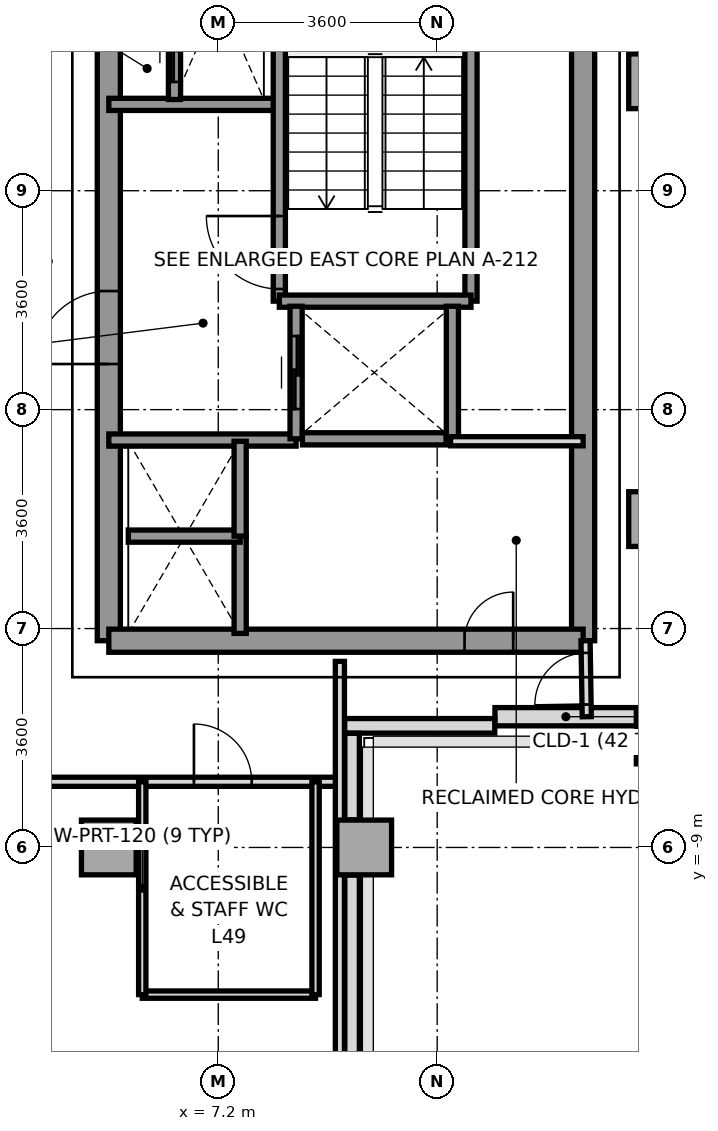
"""IFC4 building model, lengths in metres.
Left out: names, types, materials, properties, quantities, classifications, styles, units other than length and angle.
Written with IfcOpenShell. Run it as: python <this file> out.ifc"""

import sys

from ifc_helpers import new_model, si_unit, direction, frame, frame_2d, origin, origin_2d, place, context, subcontext, project, spatial, rectangle, extrude, source, transform, mapped, element, fill, save


model = new_model("IFC4")
c1 = context("Model", 3, precision=1e-05, world=origin(), true_north=direction((0.0, 1.0)))
c2 = subcontext(c1, "Body", "Model", "MODEL_VIEW")
j1 = project(units=[si_unit("LENGTHUNIT", "METRE"), si_unit("PLANEANGLEUNIT", "RADIAN")], contexts=[c1])
p1 = place(None, origin())
s1 = spatial("IfcSite", under=j1, at=p1, CompositionType="ELEMENT")
p2 = place(p1, origin())
s2 = spatial("IfcBuilding", under=s1, at=p2, CompositionType="ELEMENT")
p3 = place(p2, frame((0.0, 0.0, 180.8)))
s3 = spatial("IfcBuildingStorey", under=s2, at=p3, CompositionType="ELEMENT", Elevation=180.8)
m1 = source(origin(), c2, "Body", "SweptSolid", [
    extrude(rectangle(XDim=0.9, YDim=0.9, at=origin_2d()), origin(), (0.0, 0.0, 1.0), 3.2),
])
for number, where, z_axis, x_axis in (
    (1, (5.4, -9.0, 0.0), (0.0, 0.0, 1.0), (1.0, 0.0, 0.0)),
    (2, (9.6, -9.0, 0.0), (0.0, 0.0, 1.0), (1.0, 0.0, 0.0)),
):
    element("IfcColumn", number, at=place(p3, frame(where, z_axis=z_axis, x_axis=x_axis)), inside=s3, PredefinedType="COLUMN", context=c2, shape_type="MappedRepresentation", body=[
        mapped(m1, transform((0.0, 0.0, 0.0), x_axis=(1.0, 0.0, 0.0), y_axis=(0.0, 1.0, 0.0), z_axis=(0.0, 0.0, 1.0), scale=1.0)),
    ])
m2 = source(origin(), c2, "Body", "SweptSolid", [
    extrude(rectangle(XDim=0.65, YDim=0.85, at=origin_2d()), origin(), (0.0, 0.0, 1.0), 3.2),
])
p4 = place(p3, frame((14.4, -7.2, 0.0), z_axis=(0.0, 0.0, 1.0), x_axis=(1.0, 0.0, 0.0)))
e3 = element("IfcColumn", 3, at=p4, inside=s3, PredefinedType="COLUMN", context=c2, shape_type="MappedRepresentation", body=[
    mapped(m2, transform((0.0, 0.0, 0.0), x_axis=(1.0, 0.0, 0.0), y_axis=(0.0, 1.0, 0.0), z_axis=(0.0, 0.0, 1.0), scale=1.0)),
])
for number, where, z_axis, x_axis in (
    (4, (14.4, -3.6, 0.0), (0.0, 0.0, 1.0), (1.0, 0.0, 0.0)),
    (5, (14.4, 3.6, 0.0), (0.0, 0.0, 1.0), (1.0, 0.0, 0.0)),
):
    element("IfcColumn", number, at=place(p3, frame(where, z_axis=z_axis, x_axis=x_axis)), inside=s3, PredefinedType="COLUMN", context=c2, shape_type="MappedRepresentation", body=[
        mapped(m1, transform((0.0, 0.0, 0.0), x_axis=(1.0, 0.0, 0.0), y_axis=(0.0, 1.0, 0.0), z_axis=(0.0, 0.0, 1.0), scale=1.0)),
    ])
p5 = place(p3, frame((11.75, -6.85, 0.0), z_axis=(0.0, 0.0, 1.0), x_axis=(1.0, 0.0, 0.0)))
e6 = element("IfcWall", 6, at=p5, inside=s3, PredefinedType="SOLIDWALL", context=c2, shape_type="SweptSolid", body=[
    extrude(rectangle(XDim=2.333, YDim=0.3, at=frame_2d((1.167, 0.0))), origin(), (0.0, 0.0, 1.0), 3.2),
])
p6 = place(p3, frame((11.747, -7.0, 0.0), z_axis=(0.0, 0.0, 1.0), x_axis=(-1.0, 0.0, 0.0)))
e7 = element("IfcWall", 7, at=p6, inside=s3, PredefinedType="PARAPET", context=c2, shape_type="SweptSolid", body=[
    extrude(rectangle(XDim=2.469, YDim=0.24, at=frame_2d((1.234, 0.0))), origin(), (0.0, 0.0, 1.0), 1.15),
])
p7 = place(p3, frame((9.4, -7.123, 0.0), z_axis=(0.0, 0.0, 1.0), x_axis=(0.0, -1.0, 0.0)))
e8 = element("IfcWall", 8, at=p7, inside=s3, PredefinedType="PARAPET", context=c2, shape_type="SweptSolid", body=[
    extrude(rectangle(XDim=1.424, YDim=0.24, at=frame_2d((0.712, 0.0))), origin(), (0.0, 0.0, 1.0), 1.15),
])
p8 = place(p3, frame((9.4, -9.453, 0.0), z_axis=(0.0, 0.0, 1.0), x_axis=(0.0, -1.0, 0.0)))
e9 = element("IfcWall", 9, at=p8, inside=s3, PredefinedType="PARAPET", context=c2, shape_type="SweptSolid", body=[
    extrude(rectangle(XDim=6.15, YDim=0.24, at=frame_2d((3.075, 0.0))), origin(), (0.0, 0.0, 1.0), 1.15),
])
p9 = place(p3, frame((13.2, -5.6, 0.0), z_axis=(0.0, 0.0, 1.0), x_axis=(0.0, 1.0, 0.0)))
e10 = element("IfcWall", 10, at=p9, inside=s3, PredefinedType="SHEAR", context=c2, shape_type="SweptSolid", body=[
    extrude(rectangle(XDim=11.2, YDim=0.38, at=frame_2d((5.6, 0.0))), origin(), (0.0, 0.0, 1.0), 3.2),
])
p10 = place(p3, frame((5.4, -5.6, 0.0), z_axis=(0.0, 0.0, 1.0), x_axis=(0.0, 1.0, 0.0)))
e11 = element("IfcWall", 11, at=p10, inside=s3, PredefinedType="SHEAR", context=c2, shape_type="SweptSolid", body=[
    extrude(rectangle(XDim=12.5, YDim=0.38, at=frame_2d((6.25, 0.0))), origin(), (0.0, 0.0, 1.0), 3.2),
])
p11 = place(p10, frame((4.55, 0.0, 0.0)))
e12 = element("IfcOpeningElement", 12, at=p11, cuts=e11, PredefinedType="OPENING", context=c2, shape_type="SweptSolid", body=[
    extrude(rectangle(XDim=1.2, YDim=2.2, at=frame_2d((0.6, 1.1))), frame((0.0, 0.2, 0.0), z_axis=(0.0, -1.0, 0.0), x_axis=(1.0, 0.0, 0.0)), (0.0, 0.0, 1.0), 0.4),
])
p12 = place(p10, frame((10.45, 0.0, 0.0)))
e13 = element("IfcOpeningElement", 13, at=p12, cuts=e11, PredefinedType="OPENING", context=c2, shape_type="SweptSolid", body=[
    extrude(rectangle(XDim=1.2, YDim=2.2, at=frame_2d((0.6, 1.1))), frame((0.0, 0.2, 0.0), z_axis=(0.0, -1.0, 0.0), x_axis=(1.0, 0.0, 0.0)), (0.0, 0.0, 1.0), 0.4),
])
p13 = place(p3, frame((5.4, -5.6, 0.0), z_axis=(0.0, 0.0, 1.0), x_axis=(1.0, 0.0, 0.0)))
e14 = element("IfcWall", 14, at=p13, inside=s3, PredefinedType="SHEAR", context=c2, shape_type="SweptSolid", body=[
    extrude(rectangle(XDim=7.8, YDim=0.38, at=frame_2d((3.9, 0.0))), origin(), (0.0, 0.0, 1.0), 3.2),
])
p14 = place(p13, frame((5.85, 0.0, 0.0)))
e15 = element("IfcOpeningElement", 15, at=p14, cuts=e14, PredefinedType="OPENING", context=c2, shape_type="SweptSolid", body=[
    extrude(rectangle(XDim=0.8, YDim=2.1, at=frame_2d((0.4, 1.05))), frame((0.0, 0.2, 0.0), z_axis=(0.0, -1.0, 0.0), x_axis=(1.0, 0.0, 0.0)), (0.0, 0.0, 1.0), 0.4),
])
p15 = place(p3, frame((5.4, 3.22, 0.0), z_axis=(0.0, 0.0, 1.0), x_axis=(1.0, 0.0, 0.0)))
e16 = element("IfcWall", 16, at=p15, inside=s3, PredefinedType="SOLIDWALL", context=c2, shape_type="SweptSolid", body=[
    extrude(rectangle(XDim=2.78, YDim=0.2, at=frame_2d((1.39, 0.0))), origin(), (0.0, 0.0, 1.0), 3.2),
])
p16 = place(p3, frame((5.4, -2.3, 0.0), z_axis=(0.0, 0.0, 1.0), x_axis=(1.0, 0.0, 0.0)))
e17 = element("IfcWall", 17, at=p16, inside=s3, PredefinedType="SOLIDWALL", context=c2, shape_type="SweptSolid", body=[
    extrude(rectangle(XDim=3.08, YDim=0.2, at=frame_2d((1.54, 0.0))), origin(), (0.0, 0.0, 1.0), 3.2),
])
p17 = place(p3, frame((8.204, -0.016, 0.0), z_axis=(0.0, 0.0, 1.0), x_axis=(0.0, 1.0, 0.0)))
e18 = element("IfcWall", 18, at=p17, inside=s3, PredefinedType="SOLIDWALL", context=c2, shape_type="SweptSolid", body=[
    extrude(rectangle(XDim=6.916, YDim=0.2, at=frame_2d((3.458, 0.0))), origin(), (0.0, 0.0, 1.0), 3.2),
])
p18 = place(p17, frame((0.2, 0.0, 0.0)))
e19 = element("IfcOpeningElement", 19, at=p18, cuts=e18, PredefinedType="OPENING", context=c2, shape_type="SweptSolid", body=[
    extrude(rectangle(XDim=1.2, YDim=2.2, at=frame_2d((0.6, 1.1))), frame((0.0, 0.11, 0.0), z_axis=(0.0, -1.0, 0.0), x_axis=(1.0, 0.0, 0.0)), (0.0, 0.0, 1.0), 0.22),
])
p19 = place(p3, frame((11.356, -0.016, 0.0), z_axis=(0.0, 0.0, 1.0), x_axis=(0.0, 1.0, 0.0)))
e20 = element("IfcWall", 20, at=p19, inside=s3, PredefinedType="SOLIDWALL", context=c2, shape_type="SweptSolid", body=[
    extrude(rectangle(XDim=6.916, YDim=0.2, at=frame_2d((3.458, 0.0))), origin(), (0.0, 0.0, 1.0), 3.2),
])
p20 = place(p3, frame((8.204, -0.016, 0.0), z_axis=(0.0, 0.0, 1.0), x_axis=(1.0, 0.0, 0.0)))
e21 = element("IfcWall", 21, at=p20, inside=s3, PredefinedType="SOLIDWALL", context=c2, shape_type="SweptSolid", body=[
    extrude(rectangle(XDim=3.152, YDim=0.2, at=frame_2d((1.576, 0.0))), origin(), (0.0, 0.0, 1.0), 3.2),
])
p21 = place(p3, frame((8.48, -2.28, 0.0), z_axis=(0.0, 0.0, 1.0), x_axis=(0.0, 1.0, 0.0)))
e22 = element("IfcWall", 22, at=p21, inside=s3, PredefinedType="SOLIDWALL", context=c2, shape_type="SweptSolid", body=[
    extrude(rectangle(XDim=2.18, YDim=0.2, at=frame_2d((1.09, 0.0))), origin(), (0.0, 0.0, 1.0), 3.2),
])
p22 = place(p21, frame((0.49, 0.0, 0.0)))
e23 = element("IfcOpeningElement", 23, at=p22, cuts=e22, PredefinedType="OPENING", context=c2, shape_type="SweptSolid", body=[
    extrude(rectangle(XDim=1.2, YDim=2.2, at=frame_2d((0.6, 1.1))), frame((0.0, 0.11, 0.0), z_axis=(0.0, -1.0, 0.0), x_axis=(1.0, 0.0, 0.0)), (0.0, 0.0, 1.0), 0.22),
])
p23 = place(p3, frame((11.05, -2.28, 0.0), z_axis=(0.0, 0.0, 1.0), x_axis=(0.0, 1.0, 0.0)))
e24 = element("IfcWall", 24, at=p23, inside=s3, PredefinedType="SOLIDWALL", context=c2, shape_type="SweptSolid", body=[
    extrude(rectangle(XDim=2.18, YDim=0.2, at=frame_2d((1.09, 0.0))), origin(), (0.0, 0.0, 1.0), 3.2),
])
p24 = place(p3, frame((8.584, -2.28, 0.0), z_axis=(0.0, 0.0, 1.0), x_axis=(1.0, 0.0, 0.0)))
e25 = element("IfcWall", 25, at=p24, inside=s3, PredefinedType="SOLIDWALL", context=c2, shape_type="SweptSolid", body=[
    extrude(rectangle(XDim=2.362, YDim=0.2, at=frame_2d((1.181, 0.0))), origin(), (0.0, 0.0, 1.0), 3.2),
])
p25 = place(p3, frame((7.56, -5.48, 0.0), z_axis=(0.0, 0.0, 1.0), x_axis=(0.0, 1.0, 0.0)))
e26 = element("IfcWall", 26, at=p25, inside=s3, PredefinedType="SOLIDWALL", context=c2, shape_type="SweptSolid", body=[
    extrude(rectangle(XDim=1.6, YDim=0.2, at=frame_2d((0.8, 0.0))), origin(), (0.0, 0.0, 1.0), 3.2),
])
p26 = place(p3, frame((5.72, -3.88, 0.0), z_axis=(0.0, 0.0, 1.0), x_axis=(1.0, 0.0, 0.0)))
e27 = element("IfcWall", 27, at=p26, inside=s3, PredefinedType="SOLIDWALL", context=c2, shape_type="SweptSolid", body=[
    extrude(rectangle(XDim=1.84, YDim=0.2, at=frame_2d((0.92, 0.0))), origin(), (0.0, 0.0, 1.0), 3.2),
])
p27 = place(p3, frame((7.56, -3.88, 0.0), z_axis=(0.0, 0.0, 1.0), x_axis=(0.0, 1.0, 0.0)))
e28 = element("IfcWall", 28, at=p27, inside=s3, PredefinedType="SOLIDWALL", context=c2, shape_type="SweptSolid", body=[
    extrude(rectangle(XDim=1.56, YDim=0.2, at=frame_2d((0.78, 0.0))), origin(), (0.0, 0.0, 1.0), 3.2),
])
p28 = place(p3, frame((6.48, 3.3, 0.0), z_axis=(0.0, 0.0, 1.0), x_axis=(0.0, 1.0, 0.0)))
e29 = element("IfcWall", 29, at=p28, inside=s3, PredefinedType="SOLIDWALL", context=c2, shape_type="SweptSolid", body=[
    extrude(rectangle(XDim=1.68, YDim=0.2, at=frame_2d((0.84, 0.0))), origin(), (0.0, 0.0, 1.0), 3.2),
])
p29 = place(p28, frame((0.29, 0.0, 0.0)))
e30 = element("IfcOpeningElement", 30, at=p29, cuts=e29, PredefinedType="OPENING", context=c2, shape_type="SweptSolid", body=[
    extrude(rectangle(XDim=1.1, YDim=2.2, at=frame_2d((0.55, 1.1))), frame((0.0, 0.11, 0.0), z_axis=(0.0, -1.0, 0.0), x_axis=(1.0, 0.0, 0.0)), (0.0, 0.0, 1.0), 0.22),
])
p30 = place(p3, frame((11.02, -2.32, 0.0), z_axis=(0.0, 0.0, 1.0), x_axis=(1.0, 0.0, 0.0)))
e31 = element("IfcWall", 31, at=p30, inside=s3, PredefinedType="PARTITIONING", context=c2, shape_type="SweptSolid", body=[
    extrude(rectangle(XDim=2.18, YDim=0.15, at=frame_2d((1.09, 0.0))), origin(), (0.0, 0.0, 1.0), 3.2),
])
p31 = place(p3, frame((-9.2, -7.92, 0.0), z_axis=(0.0, 0.0, 1.0), x_axis=(1.0, 0.0, 0.0)))
e32 = element("IfcWall", 32, at=p31, inside=s3, PredefinedType="PARTITIONING", context=c2, shape_type="SweptSolid", body=[
    extrude(rectangle(XDim=18.4, YDim=0.15, at=frame_2d((9.2, 0.0))), origin(), (0.0, 0.0, 1.0), 2.8),
])
p32 = place(p31, frame((16.0, 0.0, 0.0)))
e33 = element("IfcOpeningElement", 33, at=p32, cuts=e32, PredefinedType="OPENING", context=c2, shape_type="SweptSolid", body=[
    extrude(rectangle(XDim=0.95, YDim=2.15, at=frame_2d((0.475, 1.075))), frame((0.0, 0.085, 0.0), z_axis=(0.0, -1.0, 0.0), x_axis=(1.0, 0.0, 0.0)), (0.0, 0.0, 1.0), 0.17),
])
p33 = place(p31, frame((2.2, 0.0, 0.0)))
e34 = element("IfcOpeningElement", 34, at=p33, cuts=e32, PredefinedType="OPENING", context=c2, shape_type="SweptSolid", body=[
    extrude(rectangle(XDim=0.95, YDim=2.15, at=frame_2d((0.475, 1.075))), frame((0.0, 0.085, 0.0), z_axis=(0.0, -1.0, 0.0), x_axis=(1.0, 0.0, 0.0)), (0.0, 0.0, 1.0), 0.17),
])
p34 = place(p31, frame((7.8, 0.0, 0.0)))
e35 = element("IfcOpeningElement", 35, at=p34, cuts=e32, PredefinedType="OPENING", context=c2, shape_type="SweptSolid", body=[
    extrude(rectangle(XDim=1.1, YDim=2.2, at=frame_2d((0.55, 1.1))), frame((0.0, 0.085, 0.0), z_axis=(0.0, -1.0, 0.0), x_axis=(1.0, 0.0, 0.0)), (0.0, 0.0, 1.0), 0.17),
])
p35 = place(p31, frame((11.15, 0.0, 0.0)))
e36 = element("IfcOpeningElement", 36, at=p35, cuts=e32, PredefinedType="OPENING", context=c2, shape_type="SweptSolid", body=[
    extrude(rectangle(XDim=0.95, YDim=2.15, at=frame_2d((0.475, 1.075))), frame((0.0, 0.085, 0.0), z_axis=(0.0, -1.0, 0.0), x_axis=(1.0, 0.0, 0.0)), (0.0, 0.0, 1.0), 0.17),
])
p36 = place(p3, frame((9.2, -15.68, 0.0), z_axis=(0.0, 0.0, 1.0), x_axis=(0.0, 1.0, 0.0)))
e37 = element("IfcWall", 37, at=p36, inside=s3, PredefinedType="PARTITIONING", context=c2, shape_type="SweptSolid", body=[
    extrude(rectangle(XDim=9.74, YDim=0.15, at=frame_2d((4.87, 0.0))), origin(), (0.0, 0.0, 1.0), 2.75),
])
p37 = place(p3, frame((5.95, -11.42, 0.0), z_axis=(0.0, 0.0, 1.0), x_axis=(1.0, 0.0, 0.0)))
e38 = element("IfcWall", 38, at=p37, inside=s3, PredefinedType="PARTITIONING", context=c2, shape_type="SweptSolid", body=[
    extrude(rectangle(XDim=2.85, YDim=0.12, at=frame_2d((1.425, 0.0))), origin(), (0.0, 0.0, 1.0), 3.2),
])
for number, where, z_axis, x_axis in (
    (39, (5.95, -11.42, 0.0), (0.0, 0.0, 1.0), (0.0, 1.0, 0.0)),
    (40, (8.8, -11.42, 0.0), (0.0, 0.0, 1.0), (0.0, 1.0, 0.0)),
):
    element("IfcWall", number, at=place(p3, frame(where, z_axis=z_axis, x_axis=x_axis)), inside=s3, PredefinedType="PARTITIONING", context=c2, shape_type="SweptSolid", body=[
        extrude(rectangle(XDim=3.5, YDim=0.12, at=frame_2d((1.75, 0.0))), origin(), (0.0, 0.0, 1.0), 2.75),
    ])
p38 = place(p3, frame((13.26, -6.85, 0.0), z_axis=(0.0, 0.0, 1.0), x_axis=(-0.016013571389, 0.999871774545, 0.0)))
e41 = element("IfcWall", 41, at=p38, inside=s3, PredefinedType="PARTITIONING", context=c2, shape_type="SweptSolid", body=[
    extrude(rectangle(XDim=1.25, YDim=0.15, at=frame_2d((0.625, 0.0))), origin(), (0.0, 0.0, 1.0), 3.2),
])
p39 = place(p38, frame((0.2, 0.0, 0.0)))
e42 = element("IfcOpeningElement", 42, at=p39, cuts=e41, PredefinedType="OPENING", context=c2, shape_type="SweptSolid", body=[
    extrude(rectangle(XDim=0.85, YDim=2.1, at=frame_2d((0.425, 1.05))), frame((0.0, 0.085, 0.0), z_axis=(0.0, -1.0, 0.0), x_axis=(1.0, 0.0, 0.0)), (0.0, 0.0, 1.0), 0.17),
])
m3 = source(origin(), c2, "Body", "SweptSolid", [
    extrude(rectangle(XDim=1.2, YDim=2.2, at=frame_2d((0.6, 1.1))), frame((0.0, 0.025, 0.0), z_axis=(0.0, -1.0, 0.0), x_axis=(1.0, 0.0, 0.0)), (0.0, 0.0, 1.0), 0.05),
])
p40 = place(p18, origin())
e43 = element("IfcDoor", 43, at=p40, inside=s3, OperationType="SINGLE_SWING_RIGHT", PredefinedType="DOOR", context=c2, shape_type="MappedRepresentation", body=[
    mapped(m3, transform((0.0, 0.0, 0.0), x_axis=(1.0, 0.0, 0.0), y_axis=(0.0, 1.0, 0.0), z_axis=(0.0, 0.0, 1.0), scale=1.0)),
])
fill(e19, e43)
p41 = place(p11, origin())
e44 = element("IfcDoor", 44, at=p41, inside=s3, OperationType="SINGLE_SWING_LEFT", PredefinedType="DOOR", context=c2, shape_type="MappedRepresentation", body=[
    mapped(m3, transform((0.0, 0.0, 0.0), x_axis=(1.0, 0.0, 0.0), y_axis=(0.0, 1.0, 0.0), z_axis=(0.0, 0.0, 1.0), scale=1.0)),
])
fill(e12, e44)
m4 = source(origin(), c2, "Body", "SweptSolid", [
    extrude(rectangle(XDim=0.8, YDim=2.1, at=frame_2d((0.4, 1.05))), frame((0.0, 0.025, 0.0), z_axis=(0.0, -1.0, 0.0), x_axis=(1.0, 0.0, 0.0)), (0.0, 0.0, 1.0), 0.05),
])
p42 = place(p14, origin())
e45 = element("IfcDoor", 45, at=p42, inside=s3, OperationType="SINGLE_SWING_RIGHT", PredefinedType="DOOR", context=c2, shape_type="MappedRepresentation", body=[
    mapped(m4, transform((0.0, 0.0, 0.0), x_axis=(1.0, 0.0, 0.0), y_axis=(0.0, 1.0, 0.0), z_axis=(0.0, 0.0, 1.0), scale=1.0)),
])
fill(e15, e45)
p43 = place(p22, origin())
e46 = element("IfcDoor", 46, at=p43, inside=s3, OperationType="SLIDING_TO_RIGHT", PredefinedType="DOOR", context=c2, shape_type="MappedRepresentation", body=[
    mapped(m3, transform((0.0, 0.0, 0.0), x_axis=(1.0, 0.0, 0.0), y_axis=(0.0, 1.0, 0.0), z_axis=(0.0, 0.0, 1.0), scale=1.0)),
])
fill(e23, e46)
m5 = source(origin(), c2, "Body", "SweptSolid", [
    extrude(rectangle(XDim=1.1, YDim=2.2, at=frame_2d((0.55, 1.1))), frame((0.0, 0.025, 0.0), z_axis=(0.0, -1.0, 0.0), x_axis=(1.0, 0.0, 0.0)), (0.0, 0.0, 1.0), 0.05),
])
p44 = place(p29, origin())
e47 = element("IfcDoor", 47, at=p44, inside=s3, OperationType="SLIDING_TO_LEFT", PredefinedType="DOOR", context=c2, shape_type="MappedRepresentation", body=[
    mapped(m5, transform((0.0, 0.0, 0.0), x_axis=(1.0, 0.0, 0.0), y_axis=(0.0, 1.0, 0.0), z_axis=(0.0, 0.0, 1.0), scale=1.0)),
])
fill(e30, e47)
m6 = source(origin(), c2, "Body", "SweptSolid", [
    extrude(rectangle(XDim=0.95, YDim=2.15, at=frame_2d((0.475, 1.075))), frame((0.0, 0.025, 0.0), z_axis=(0.0, -1.0, 0.0), x_axis=(1.0, 0.0, 0.0)), (0.0, 0.0, 1.0), 0.05),
])
p45 = place(p32, origin())
e48 = element("IfcDoor", 48, at=p45, inside=s3, OperationType="SINGLE_SWING_LEFT", PredefinedType="DOOR", context=c2, shape_type="MappedRepresentation", body=[
    mapped(m6, transform((0.0, 0.0, 0.0), x_axis=(1.0, 0.0, 0.0), y_axis=(0.0, 1.0, 0.0), z_axis=(0.0, 0.0, 1.0), scale=1.0)),
])
fill(e33, e48)
m7 = source(origin(), c2, "Body", "SweptSolid", [
    extrude(rectangle(XDim=0.85, YDim=2.1, at=frame_2d((0.425, 1.05))), frame((0.0, 0.025, 0.0), z_axis=(0.0, -1.0, 0.0), x_axis=(1.0, 0.0, 0.0)), (0.0, 0.0, 1.0), 0.05),
])
p46 = place(p39, origin())
e49 = element("IfcDoor", 49, at=p46, inside=s3, OperationType="SINGLE_SWING_LEFT", PredefinedType="DOOR", context=c2, shape_type="MappedRepresentation", body=[
    mapped(m7, transform((0.0, 0.0, 0.0), x_axis=(1.0, 0.0, 0.0), y_axis=(0.0, 1.0, 0.0), z_axis=(0.0, 0.0, 1.0), scale=1.0)),
])
fill(e42, e49)
save(model, sys.argv[1])
